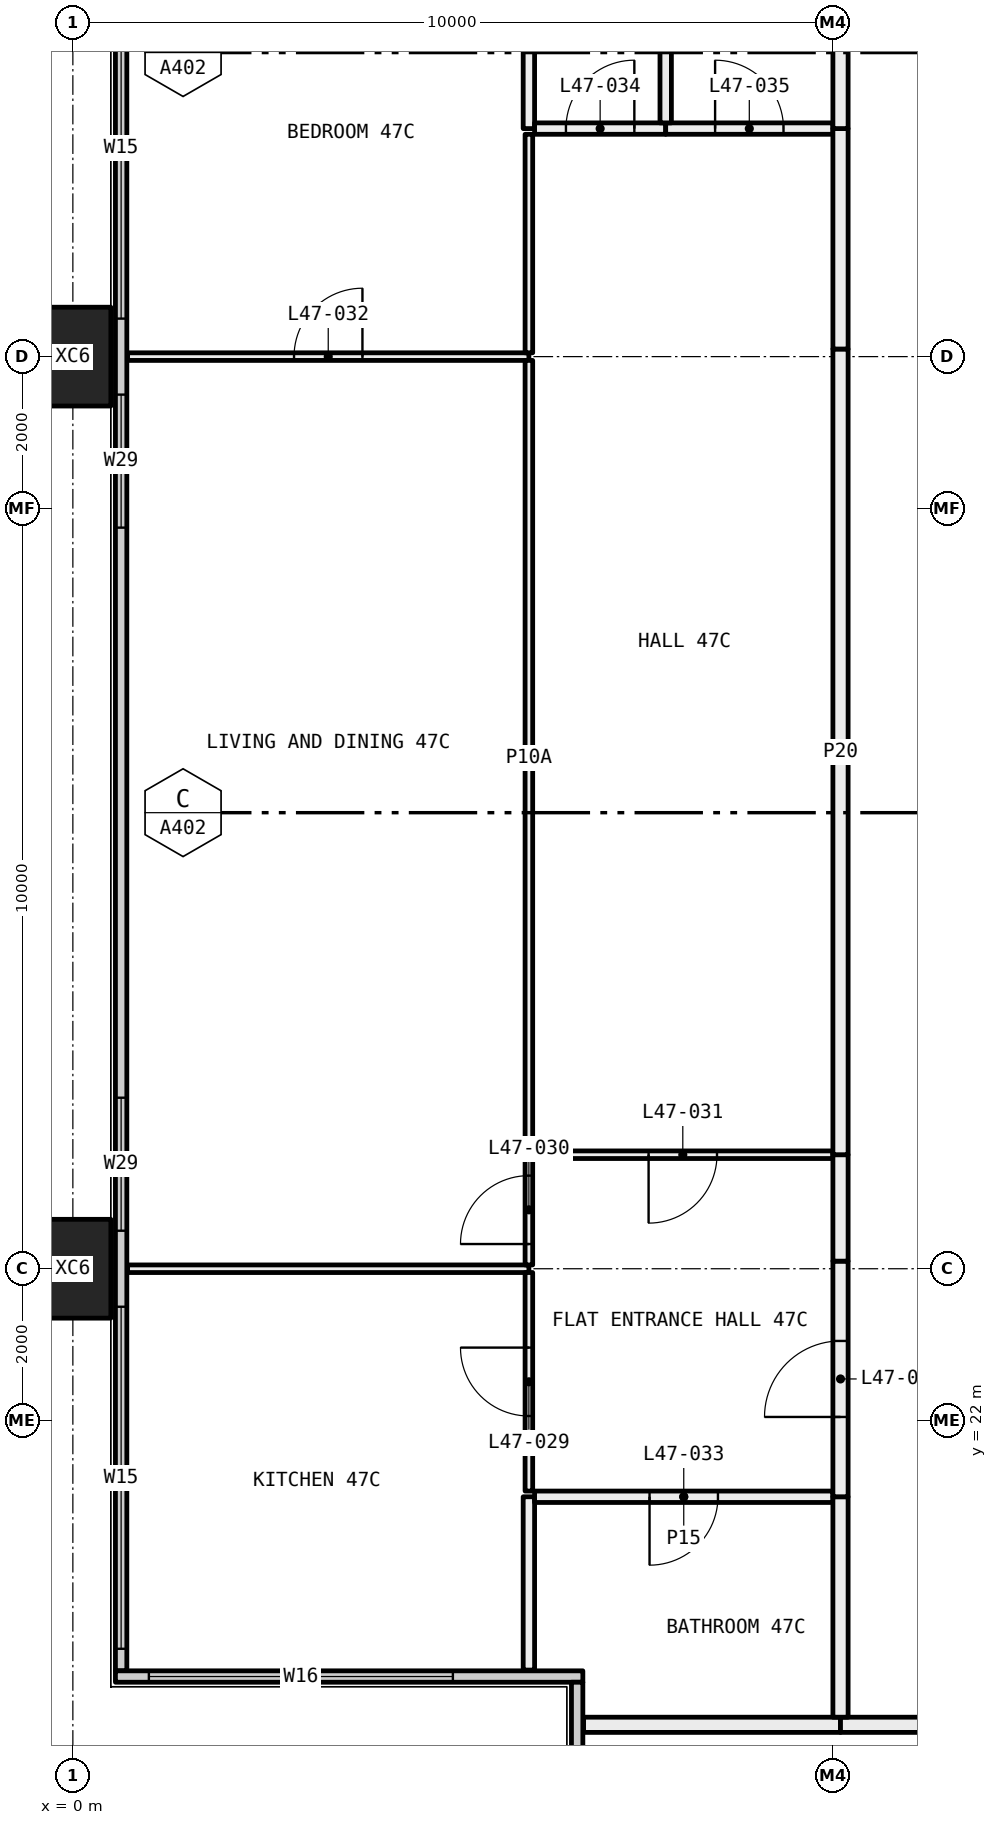
"""IFC4 building model, lengths in metres.
Left out: names, types, materials, properties, quantities, classifications, styles, units other than length and angle.
Written with IfcOpenShell. Run it as: python <this file> out.ifc"""

import sys

from ifc_helpers import new_model, si_unit, direction, frame, frame_2d, origin, origin_2d, place, context, subcontext, project, spatial, rectangle, hollow_rectangle, extrude, element, fill, save


model = new_model("IFC4")
c1 = context("Model", 3, precision=1e-05, world=origin(), true_north=direction((0.0, 1.0)))
c2 = subcontext(c1, "Body", "Model", "MODEL_VIEW")
j1 = project(units=[si_unit("LENGTHUNIT", "METRE"), si_unit("PLANEANGLEUNIT", "RADIAN")], contexts=[c1])
p1 = place(None, origin())
s1 = spatial("IfcSite", under=j1, at=p1, CompositionType="ELEMENT")
p2 = place(p1, origin())
s2 = spatial("IfcBuilding", under=s1, at=p2, CompositionType="ELEMENT")
p3 = place(p2, frame((0.0, 0.0, 178.95)))
s3 = spatial("IfcBuildingStorey", under=s2, at=p3, CompositionType="ELEMENT", Elevation=178.95)
for number, where, z_axis, x_axis in (
    (1, (0.0, 24.0, -0.4), (0.0, 0.0, 1.0), (0.0, 1.0, 0.0)),
    (2, (0.0, 36.0, -0.4), (0.0, 0.0, 1.0), (0.0, 1.0, 0.0)),
):
    element("IfcColumn", number, at=place(p3, frame(where, z_axis=z_axis, x_axis=x_axis)), inside=s3, PredefinedType="COLUMN", context=c2, shape_type="SweptSolid", body=[
        extrude(hollow_rectangle(XDim=1.3, YDim=1.0, WallThickness=0.05, at=origin_2d()), origin(), (0.0, 0.0, 1.0), 3.45),
    ])
p4 = place(p3, frame((0.635, 18.71, 0.0), z_axis=(0.0, 0.0, 1.0), x_axis=(0.0, 1.0, 0.0)))
e3 = element("IfcWall", 3, at=p4, inside=s3, PredefinedType="ELEMENTEDWALL", context=c2, shape_type="SweptSolid", body=[
    extrude(rectangle(XDim=22.58, YDim=0.15, at=frame_2d((11.29, 0.0))), origin(), (0.0, 0.0, 1.0), 3.05),
])
p5 = place(p4, frame((0.29, 0.0, 0.45)))
e4 = element("IfcOpeningElement", 4, at=p5, cuts=e3, PredefinedType="OPENING", context=c2, shape_type="SweptSolid", body=[
    extrude(rectangle(XDim=4.5, YDim=2.55, at=frame_2d((2.25, 1.275))), frame((0.0, 0.085, 0.0), z_axis=(0.0, -1.0, 0.0), x_axis=(1.0, 0.0, 0.0)), (0.0, 0.0, 1.0), 0.17),
])
p6 = place(p4, frame((5.79, 0.0, 0.45)))
e5 = element("IfcOpeningElement", 5, at=p6, cuts=e3, PredefinedType="OPENING", context=c2, shape_type="SweptSolid", body=[
    extrude(rectangle(XDim=1.75, YDim=2.55, at=frame_2d((0.875, 1.275))), frame((0.0, 0.085, 0.0), z_axis=(0.0, -1.0, 0.0), x_axis=(1.0, 0.0, 0.0)), (0.0, 0.0, 1.0), 0.17),
])
p7 = place(p4, frame((15.04, 0.0, 0.45)))
e6 = element("IfcOpeningElement", 6, at=p7, cuts=e3, PredefinedType="OPENING", context=c2, shape_type="SweptSolid", body=[
    extrude(rectangle(XDim=1.75, YDim=2.55, at=frame_2d((0.875, 1.275))), frame((0.0, 0.085, 0.0), z_axis=(0.0, -1.0, 0.0), x_axis=(1.0, 0.0, 0.0)), (0.0, 0.0, 1.0), 0.17),
])
p8 = place(p4, frame((17.79, 0.0, 0.45)))
e7 = element("IfcOpeningElement", 7, at=p8, cuts=e3, PredefinedType="OPENING", context=c2, shape_type="SweptSolid", body=[
    extrude(rectangle(XDim=4.5, YDim=2.55, at=frame_2d((2.25, 1.275))), frame((0.0, 0.085, 0.0), z_axis=(0.0, -1.0, 0.0), x_axis=(1.0, 0.0, 0.0)), (0.0, 0.0, 1.0), 0.17),
])
p9 = place(p3, frame((0.56, 18.635, 0.0), z_axis=(0.0, 0.0, 1.0), x_axis=(1.0, 0.0, 0.0)))
e8 = element("IfcWall", 8, at=p9, inside=s3, PredefinedType="ELEMENTEDWALL", context=c2, shape_type="SweptSolid", body=[
    extrude(rectangle(XDim=6.15, YDim=0.15, at=frame_2d((3.075, 0.0))), origin(), (0.0, 0.0, 1.0), 3.05),
])
p10 = place(p9, frame((0.44, 0.0, 0.45)))
e9 = element("IfcOpeningElement", 9, at=p10, cuts=e8, PredefinedType="OPENING", context=c2, shape_type="SweptSolid", body=[
    extrude(rectangle(XDim=4.0, YDim=2.55, at=frame_2d((2.0, 1.275))), frame((0.0, 0.085, 0.0), z_axis=(0.0, -1.0, 0.0), x_axis=(1.0, 0.0, 0.0)), (0.0, 0.0, 1.0), 0.17),
])
p11 = place(p3, frame((6.635, 12.71, 0.0), z_axis=(0.0, 0.0, 1.0), x_axis=(0.0, 1.0, 0.0)))
e10 = element("IfcWall", 10, at=p11, inside=s3, PredefinedType="ELEMENTEDWALL", context=c2, shape_type="SweptSolid", body=[
    extrude(rectangle(XDim=5.85, YDim=0.15, at=frame_2d((2.925, 0.0))), origin(), (0.0, 0.0, 1.0), 3.05),
])
p12 = place(p11, frame((0.29, 0.0, 0.45)))
e11 = element("IfcOpeningElement", 11, at=p12, cuts=e10, PredefinedType="OPENING", context=c2, shape_type="SweptSolid", body=[
    extrude(rectangle(XDim=4.0, YDim=2.55, at=frame_2d((2.0, 1.275))), frame((0.0, 0.085, 0.0), z_axis=(0.0, -1.0, 0.0), x_axis=(1.0, 0.0, 0.0)), (0.0, 0.0, 1.0), 0.17),
])
p13 = place(p3, frame((10.1, 18.0, 0.0), z_axis=(0.0, 0.0, 1.0), x_axis=(-1.0, 0.0, 0.0)))
e12 = element("IfcWall", 12, at=p13, inside=s3, PredefinedType="PARTITIONING", context=c2, shape_type="SweptSolid", body=[
    extrude(rectangle(XDim=3.38, YDim=0.2, at=frame_2d((1.69, 0.0))), origin(), (0.0, 0.0, 1.0), 3.05),
])
p14 = place(p3, frame((12.0, 18.0, 0.0), z_axis=(0.0, 0.0, 1.0), x_axis=(-1.0, 0.0, 0.0)))
e13 = element("IfcWall", 13, at=p14, inside=s3, PredefinedType="PARTITIONING", context=c2, shape_type="SweptSolid", body=[
    extrude(rectangle(XDim=1.9, YDim=0.2, at=frame_2d((0.95, 0.0))), origin(), (0.0, 0.0, 1.0), 3.05),
])
p15 = place(p3, frame((6.0, 24.0, 0.0), z_axis=(0.0, 0.0, 1.0), x_axis=(-1.0, 0.0, 0.0)))
e14 = element("IfcWall", 14, at=p15, inside=s3, PredefinedType="PARTITIONING", context=c2, shape_type="SweptSolid", body=[
    extrude(rectangle(XDim=5.28, YDim=0.1, at=frame_2d((2.64, 0.0))), origin(), (0.0, 0.0, 1.0), 2.45),
])
p16 = place(p3, frame((6.0, 18.72, 0.0), z_axis=(0.0, 0.0, 1.0), x_axis=(0.0, 1.0, 0.0)))
e15 = element("IfcWall", 15, at=p16, inside=s3, PredefinedType="PARTITIONING", context=c2, shape_type="SweptSolid", body=[
    extrude(rectangle(XDim=2.28, YDim=0.15, at=frame_2d((1.14, 0.0))), origin(), (0.0, 0.0, 1.0), 3.05),
])
p17 = place(p3, frame((6.0, 21.075, 0.0), z_axis=(0.0, 0.0, 1.0), x_axis=(0.0, 1.0, 0.0)))
e16 = element("IfcWall", 16, at=p17, inside=s3, PredefinedType="PARTITIONING", context=c2, shape_type="SweptSolid", body=[
    extrude(rectangle(XDim=2.875, YDim=0.1, at=frame_2d((1.438, 0.0))), origin(), (0.0, 0.0, 1.0), 2.45),
])
p18 = place(p17, frame((0.988, 0.0, 0.0)))
e17 = element("IfcOpeningElement", 17, at=p18, cuts=e16, PredefinedType="OPENING", context=c2, shape_type="SweptSolid", body=[
    extrude(rectangle(XDim=0.9, YDim=2.1, at=frame_2d((0.45, 1.05))), frame((0.0, 0.06, 0.0), z_axis=(0.0, -1.0, 0.0), x_axis=(1.0, 0.0, 0.0)), (0.0, 0.0, 1.0), 0.12),
])
p19 = place(p3, frame((6.0, 36.0, 0.0), z_axis=(0.0, 0.0, 1.0), x_axis=(-1.0, 0.0, 0.0)))
e18 = element("IfcWall", 18, at=p19, inside=s3, PredefinedType="PARTITIONING", context=c2, shape_type="SweptSolid", body=[
    extrude(rectangle(XDim=5.28, YDim=0.1, at=frame_2d((2.64, 0.0))), origin(), (0.0, 0.0, 1.0), 2.45),
])
p20 = place(p19, frame((2.19, 0.0, 0.0)))
e19 = element("IfcOpeningElement", 19, at=p20, cuts=e18, PredefinedType="OPENING", context=c2, shape_type="SweptSolid", body=[
    extrude(rectangle(XDim=0.9, YDim=2.1, at=frame_2d((0.45, 1.05))), frame((0.0, 0.06, 0.0), z_axis=(0.0, -1.0, 0.0), x_axis=(1.0, 0.0, 0.0)), (0.0, 0.0, 1.0), 0.12),
])
p21 = place(p3, frame((6.0, 24.05, 0.0), z_axis=(0.0, 0.0, 1.0), x_axis=(0.0, 1.0, 0.0)))
e20 = element("IfcWall", 20, at=p21, inside=s3, PredefinedType="PARTITIONING", context=c2, shape_type="SweptSolid", body=[
    extrude(rectangle(XDim=1.45, YDim=0.1, at=frame_2d((0.725, 0.0))), origin(), (0.0, 0.0, 1.0), 2.45),
])
p22 = place(p21, frame((0.275, 0.0, 0.0)))
e21 = element("IfcOpeningElement", 21, at=p22, cuts=e20, PredefinedType="OPENING", context=c2, shape_type="SweptSolid", body=[
    extrude(rectangle(XDim=0.9, YDim=2.1, at=frame_2d((0.45, 1.05))), frame((0.0, 0.06, 0.0), z_axis=(0.0, -1.0, 0.0), x_axis=(1.0, 0.0, 0.0)), (0.0, 0.0, 1.0), 0.12),
])
p23 = place(p3, frame((6.0, 25.5, 0.0), z_axis=(0.0, 0.0, 1.0), x_axis=(0.0, 1.0, 0.0)))
e22 = element("IfcWall", 22, at=p23, inside=s3, PredefinedType="PARTITIONING", context=c2, shape_type="SweptSolid", body=[
    extrude(rectangle(XDim=10.45, YDim=0.1, at=frame_2d((5.225, 0.0))), origin(), (0.0, 0.0, 1.0), 2.45),
])
p24 = place(p3, frame((6.0, 36.05, 0.0), z_axis=(0.0, 0.0, 1.0), x_axis=(0.0, 1.0, 0.0)))
e23 = element("IfcWall", 23, at=p24, inside=s3, PredefinedType="PARTITIONING", context=c2, shape_type="SweptSolid", body=[
    extrude(rectangle(XDim=2.875, YDim=0.1, at=frame_2d((1.438, 0.0))), origin(), (0.0, 0.0, 1.0), 2.45),
])
p25 = place(p3, frame((6.0, 39.0, 0.0), z_axis=(0.0, 0.0, 1.0), x_axis=(0.0, 1.0, 0.0)))
e24 = element("IfcWall", 24, at=p25, inside=s3, PredefinedType="PARTITIONING", context=c2, shape_type="SweptSolid", body=[
    extrude(rectangle(XDim=2.28, YDim=0.15, at=frame_2d((1.14, 0.0))), origin(), (0.0, 0.0, 1.0), 3.05),
])
p26 = place(p3, frame((10.0, 21.0, 0.0), z_axis=(0.0, 0.0, 1.0), x_axis=(-1.0, 0.0, 0.0)))
e25 = element("IfcWall", 25, at=p26, inside=s3, PredefinedType="PARTITIONING", context=c2, shape_type="SweptSolid", body=[
    extrude(rectangle(XDim=3.925, YDim=0.15, at=frame_2d((1.962, 0.0))), origin(), (0.0, 0.0, 1.0), 3.05),
])
p27 = place(p26, frame((1.512, 0.0, 0.0)))
e26 = element("IfcOpeningElement", 26, at=p27, cuts=e25, PredefinedType="OPENING", context=c2, shape_type="SweptSolid", body=[
    extrude(rectangle(XDim=0.9, YDim=2.1, at=frame_2d((0.45, 1.05))), frame((0.0, 0.085, 0.0), z_axis=(0.0, -1.0, 0.0), x_axis=(1.0, 0.0, 0.0)), (0.0, 0.0, 1.0), 0.17),
])
p28 = place(p3, frame((10.1, 18.1, 0.0), z_axis=(0.0, 0.0, 1.0), x_axis=(0.0, 1.0, 0.0)))
e27 = element("IfcWall", 27, at=p28, inside=s3, PredefinedType="PARTITIONING", context=c2, shape_type="SweptSolid", body=[
    extrude(rectangle(XDim=2.9, YDim=0.2, at=frame_2d((1.45, 0.0))), origin(), (0.0, 0.0, 1.0), 3.05),
])
p29 = place(p3, frame((10.0, 25.5, 0.0), z_axis=(0.0, 0.0, 1.0), x_axis=(-1.0, 0.0, 0.0)))
e28 = element("IfcWall", 28, at=p29, inside=s3, PredefinedType="PARTITIONING", context=c2, shape_type="SweptSolid", body=[
    extrude(rectangle(XDim=3.95, YDim=0.1, at=frame_2d((1.975, 0.0))), origin(), (0.0, 0.0, 1.0), 3.05),
])
p30 = place(p29, frame((1.525, 0.0, 0.0)))
e29 = element("IfcOpeningElement", 29, at=p30, cuts=e28, PredefinedType="OPENING", context=c2, shape_type="SweptSolid", body=[
    extrude(rectangle(XDim=0.9, YDim=2.1, at=frame_2d((0.45, 1.05))), frame((0.0, 0.06, 0.0), z_axis=(0.0, -1.0, 0.0), x_axis=(1.0, 0.0, 0.0)), (0.0, 0.0, 1.0), 0.12),
])
p31 = place(p3, frame((10.1, 21.0, 0.0), z_axis=(0.0, 0.0, 1.0), x_axis=(0.0, 1.0, 0.0)))
e30 = element("IfcWall", 30, at=p31, inside=s3, PredefinedType="PARTITIONING", context=c2, shape_type="SweptSolid", body=[
    extrude(rectangle(XDim=3.1, YDim=0.2, at=frame_2d((1.55, 0.0))), origin(), (0.0, 0.0, 1.0), 2.45),
])
p32 = place(p31, frame((1.05, 0.0, 0.0)))
e31 = element("IfcOpeningElement", 31, at=p32, cuts=e30, PredefinedType="OPENING", context=c2, shape_type="SweptSolid", body=[
    extrude(rectangle(XDim=1.0, YDim=2.1, at=frame_2d((0.5, 1.05))), frame((0.0, 0.11, 0.0), z_axis=(0.0, -1.0, 0.0), x_axis=(1.0, 0.0, 0.0)), (0.0, 0.0, 1.0), 0.22),
])
p33 = place(p3, frame((10.1, 24.1, 0.0), z_axis=(0.0, 0.0, 1.0), x_axis=(0.0, 1.0, 0.0)))
e32 = element("IfcWall", 32, at=p33, inside=s3, PredefinedType="PARTITIONING", context=c2, shape_type="SweptSolid", body=[
    extrude(rectangle(XDim=1.4, YDim=0.2, at=frame_2d((0.7, 0.0))), origin(), (0.0, 0.0, 1.0), 3.05),
])
p34 = place(p3, frame((7.8, 39.0, 0.0), z_axis=(0.0, 0.0, 1.0), x_axis=(-1.0, 0.0, 0.0)))
e33 = element("IfcWall", 33, at=p34, inside=s3, PredefinedType="PARTITIONING", context=c2, shape_type="SweptSolid", body=[
    extrude(rectangle(XDim=1.725, YDim=0.15, at=frame_2d((0.863, 0.0))), origin(), (0.0, 0.0, 1.0), 3.05),
])
p35 = place(p34, frame((0.413, 0.0, 0.0)))
e34 = element("IfcOpeningElement", 34, at=p35, cuts=e33, PredefinedType="OPENING", context=c2, shape_type="SweptSolid", body=[
    extrude(rectangle(XDim=0.9, YDim=2.1, at=frame_2d((0.45, 1.05))), frame((0.0, 0.085, 0.0), z_axis=(0.0, -1.0, 0.0), x_axis=(1.0, 0.0, 0.0)), (0.0, 0.0, 1.0), 0.17),
])
p36 = place(p3, frame((10.0, 39.0, 0.0), z_axis=(0.0, 0.0, 1.0), x_axis=(-1.0, 0.0, 0.0)))
e35 = element("IfcWall", 35, at=p36, inside=s3, PredefinedType="PARTITIONING", context=c2, shape_type="SweptSolid", body=[
    extrude(rectangle(XDim=2.2, YDim=0.15, at=frame_2d((1.1, 0.0))), origin(), (0.0, 0.0, 1.0), 3.05),
])
p37 = place(p36, frame((0.65, 0.0, 0.0)))
e36 = element("IfcOpeningElement", 36, at=p37, cuts=e35, PredefinedType="OPENING", context=c2, shape_type="SweptSolid", body=[
    extrude(rectangle(XDim=0.9, YDim=2.1, at=frame_2d((0.45, 1.05))), frame((0.0, 0.085, 0.0), z_axis=(0.0, -1.0, 0.0), x_axis=(1.0, 0.0, 0.0)), (0.0, 0.0, 1.0), 0.17),
])
p38 = place(p3, frame((10.1, 25.5, 0.0), z_axis=(0.0, 0.0, 1.0), x_axis=(0.0, 1.0, 0.0)))
e37 = element("IfcWall", 37, at=p38, inside=s3, PredefinedType="PARTITIONING", context=c2, shape_type="SweptSolid", body=[
    extrude(rectangle(XDim=10.6, YDim=0.2, at=frame_2d((5.3, 0.0))), origin(), (0.0, 0.0, 1.0), 2.45),
])
p39 = place(p3, frame((10.1, 36.1, 0.0), z_axis=(0.0, 0.0, 1.0), x_axis=(0.0, 1.0, 0.0)))
e38 = element("IfcWall", 38, at=p39, inside=s3, PredefinedType="PARTITIONING", context=c2, shape_type="SweptSolid", body=[
    extrude(rectangle(XDim=2.9, YDim=0.2, at=frame_2d((1.45, 0.0))), origin(), (0.0, 0.0, 1.0), 3.05),
])
p40 = place(p3, frame((7.8, 39.075, 0.0), z_axis=(0.0, 0.0, 1.0), x_axis=(0.0, 1.0, 0.0)))
e39 = element("IfcWall", 39, at=p40, inside=s3, PredefinedType="PARTITIONING", context=c2, shape_type="SweptSolid", body=[
    extrude(rectangle(XDim=2.825, YDim=0.15, at=frame_2d((1.413, 0.0))), origin(), (0.0, 0.0, 1.0), 3.05),
])
p41 = place(p3, frame((10.1, 39.0, 0.0), z_axis=(0.0, 0.0, 1.0), x_axis=(0.0, 1.0, 0.0)))
e40 = element("IfcWall", 40, at=p41, inside=s3, PredefinedType="PARTITIONING", context=c2, shape_type="SweptSolid", body=[
    extrude(rectangle(XDim=2.9, YDim=0.2, at=frame_2d((1.45, 0.0))), origin(), (0.0, 0.0, 1.0), 3.05),
])
p42 = place(p5, origin())
e41 = element("IfcWindow", 41, at=p42, inside=s3, PartitioningType="SINGLE_PANEL", PredefinedType="WINDOW", context=c2, shape_type="SweptSolid", body=[
    extrude(rectangle(XDim=4.5, YDim=2.55, at=frame_2d((2.25, 1.275))), frame((0.0, 0.03, 0.0), z_axis=(0.0, -1.0, 0.0), x_axis=(1.0, 0.0, 0.0)), (0.0, 0.0, 1.0), 0.06),
])
fill(e4, e41)
p43 = place(p6, origin())
e42 = element("IfcWindow", 42, at=p43, inside=s3, PartitioningType="SINGLE_PANEL", PredefinedType="WINDOW", context=c2, shape_type="SweptSolid", body=[
    extrude(rectangle(XDim=1.75, YDim=2.55, at=frame_2d((0.875, 1.275))), frame((0.0, 0.03, 0.0), z_axis=(0.0, -1.0, 0.0), x_axis=(1.0, 0.0, 0.0)), (0.0, 0.0, 1.0), 0.06),
])
fill(e5, e42)
p44 = place(p7, origin())
e43 = element("IfcWindow", 43, at=p44, inside=s3, PartitioningType="SINGLE_PANEL", PredefinedType="WINDOW", context=c2, shape_type="SweptSolid", body=[
    extrude(rectangle(XDim=1.75, YDim=2.55, at=frame_2d((0.875, 1.275))), frame((0.0, 0.03, 0.0), z_axis=(0.0, -1.0, 0.0), x_axis=(1.0, 0.0, 0.0)), (0.0, 0.0, 1.0), 0.06),
])
fill(e6, e43)
p45 = place(p8, origin())
e44 = element("IfcWindow", 44, at=p45, inside=s3, PartitioningType="SINGLE_PANEL", PredefinedType="WINDOW", context=c2, shape_type="SweptSolid", body=[
    extrude(rectangle(XDim=4.5, YDim=2.55, at=frame_2d((2.25, 1.275))), frame((0.0, 0.03, 0.0), z_axis=(0.0, -1.0, 0.0), x_axis=(1.0, 0.0, 0.0)), (0.0, 0.0, 1.0), 0.06),
])
fill(e7, e44)
p46 = place(p10, origin())
e45 = element("IfcWindow", 45, at=p46, inside=s3, PartitioningType="SINGLE_PANEL", PredefinedType="WINDOW", context=c2, shape_type="SweptSolid", body=[
    extrude(rectangle(XDim=4.0, YDim=2.55, at=frame_2d((2.0, 1.275))), frame((0.0, 0.03, 0.0), z_axis=(0.0, -1.0, 0.0), x_axis=(1.0, 0.0, 0.0)), (0.0, 0.0, 1.0), 0.06),
])
fill(e9, e45)
p47 = place(p32, origin())
e46 = element("IfcDoor", 46, at=p47, inside=s3, OperationType="SINGLE_SWING_RIGHT", PredefinedType="DOOR", context=c2, shape_type="SweptSolid", body=[
    extrude(rectangle(XDim=1.0, YDim=2.1, at=frame_2d((0.5, 1.05))), frame((0.0, 0.025, 0.0), z_axis=(0.0, -1.0, 0.0), x_axis=(1.0, 0.0, 0.0)), (0.0, 0.0, 1.0), 0.05),
])
fill(e31, e46)
p48 = place(p18, origin())
e47 = element("IfcDoor", 47, at=p48, inside=s3, OperationType="SINGLE_SWING_LEFT", PredefinedType="DOOR", context=c2, shape_type="SweptSolid", body=[
    extrude(rectangle(XDim=0.9, YDim=2.1, at=frame_2d((0.45, 1.05))), frame((0.0, 0.025, 0.0), z_axis=(0.0, -1.0, 0.0), x_axis=(1.0, 0.0, 0.0)), (0.0, 0.0, 1.0), 0.05),
])
fill(e17, e47)
p49 = place(p22, origin())
e48 = element("IfcDoor", 48, at=p49, inside=s3, OperationType="SINGLE_SWING_RIGHT", PredefinedType="DOOR", context=c2, shape_type="SweptSolid", body=[
    extrude(rectangle(XDim=0.9, YDim=2.1, at=frame_2d((0.45, 1.05))), frame((0.0, 0.025, 0.0), z_axis=(0.0, -1.0, 0.0), x_axis=(1.0, 0.0, 0.0)), (0.0, 0.0, 1.0), 0.05),
])
fill(e21, e48)
p50 = place(p30, origin())
e49 = element("IfcDoor", 49, at=p50, inside=s3, OperationType="SINGLE_SWING_LEFT", PredefinedType="DOOR", context=c2, shape_type="SweptSolid", body=[
    extrude(rectangle(XDim=0.9, YDim=2.1, at=frame_2d((0.45, 1.05))), frame((0.0, 0.025, 0.0), z_axis=(0.0, -1.0, 0.0), x_axis=(1.0, 0.0, 0.0)), (0.0, 0.0, 1.0), 0.05),
])
fill(e29, e49)
p51 = place(p20, frame((0.9, 0.0, 0.0), x_axis=(-1.0, 0.0, 0.0)))
e50 = element("IfcDoor", 50, at=p51, inside=s3, OperationType="SINGLE_SWING_LEFT", PredefinedType="DOOR", context=c2, shape_type="SweptSolid", body=[
    extrude(rectangle(XDim=0.9, YDim=2.1, at=frame_2d((0.45, 1.05))), frame((0.0, 0.025, 0.0), z_axis=(0.0, -1.0, 0.0), x_axis=(1.0, 0.0, 0.0)), (0.0, 0.0, 1.0), 0.05),
])
fill(e19, e50)
p52 = place(p27, origin())
e51 = element("IfcDoor", 51, at=p52, inside=s3, OperationType="SINGLE_SWING_LEFT", PredefinedType="DOOR", context=c2, shape_type="SweptSolid", body=[
    extrude(rectangle(XDim=0.9, YDim=2.1, at=frame_2d((0.45, 1.05))), frame((0.0, 0.025, 0.0), z_axis=(0.0, -1.0, 0.0), x_axis=(1.0, 0.0, 0.0)), (0.0, 0.0, 1.0), 0.05),
])
fill(e26, e51)
p53 = place(p35, frame((0.9, 0.0, 0.0), x_axis=(-1.0, 0.0, 0.0)))
e52 = element("IfcDoor", 52, at=p53, inside=s3, OperationType="SINGLE_SWING_LEFT", PredefinedType="DOOR", context=c2, shape_type="SweptSolid", body=[
    extrude(rectangle(XDim=0.9, YDim=2.1, at=frame_2d((0.45, 1.05))), frame((0.0, 0.025, 0.0), z_axis=(0.0, -1.0, 0.0), x_axis=(1.0, 0.0, 0.0)), (0.0, 0.0, 1.0), 0.05),
])
fill(e34, e52)
p54 = place(p37, frame((0.9, 0.0, 0.0), x_axis=(-1.0, 0.0, 0.0)))
e53 = element("IfcDoor", 53, at=p54, inside=s3, OperationType="SINGLE_SWING_RIGHT", PredefinedType="DOOR", context=c2, shape_type="SweptSolid", body=[
    extrude(rectangle(XDim=0.9, YDim=2.1, at=frame_2d((0.45, 1.05))), frame((0.0, 0.025, 0.0), z_axis=(0.0, -1.0, 0.0), x_axis=(1.0, 0.0, 0.0)), (0.0, 0.0, 1.0), 0.05),
])
fill(e36, e53)
save(model, sys.argv[1])
